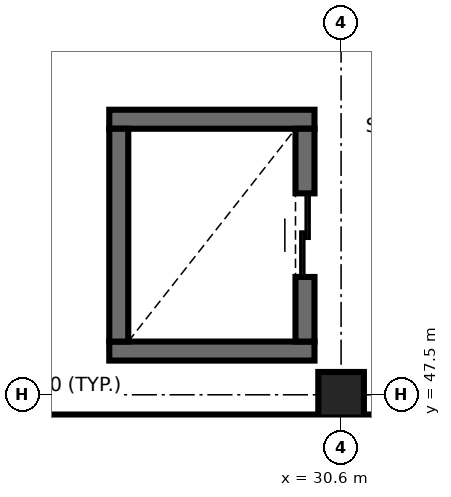
"""IFC4 building model, lengths in metres.
Left out: names, types, materials, properties, quantities, classifications, styles, units other than length and angle.
Written with IfcOpenShell. Run it as: python <this file> out.ifc"""

import sys

from ifc_helpers import new_model, si_unit, direction, frame, frame_2d, origin, origin_2d, place, context, subcontext, project, spatial, rectangle, extrude, element, fill, save


model = new_model("IFC4")
c1 = context("Model", 3, precision=1e-05, world=origin(), true_north=direction((0.0, 1.0)))
c2 = subcontext(c1, "Body", "Model", "MODEL_VIEW")
j1 = project(units=[si_unit("LENGTHUNIT", "METRE"), si_unit("PLANEANGLEUNIT", "RADIAN")], contexts=[c1])
p1 = place(None, origin())
s1 = spatial("IfcSite", under=j1, at=p1, CompositionType="ELEMENT")
p2 = place(p1, origin())
s2 = spatial("IfcBuilding", under=s1, at=p2, CompositionType="ELEMENT")
p3 = place(p2, frame((0.0, 0.0, 18.3)))
s3 = spatial("IfcBuildingStorey", under=s2, at=p3, CompositionType="ELEMENT", Elevation=18.3)
p4 = place(p3, frame((30.6, 47.5, 0.0), z_axis=(0.0, 0.0, 1.0), x_axis=(1.0, 0.0, 0.0)))
e1 = element("IfcColumn", 1, at=p4, inside=s3, PredefinedType="COLUMN", context=c2, shape_type="SweptSolid", body=[
    extrude(rectangle(XDim=0.6, YDim=0.6, at=origin_2d()), origin(), (0.0, 0.0, 1.0), 4.5),
])
for number, where, z_axis, x_axis in (
    (2, (27.55, 48.075, 0.0), (0.0, 0.0, 1.0), (1.0, 0.0, 0.0)),
    (3, (30.25, 51.125, 0.0), (0.0, 0.0, 1.0), (-1.0, 0.0, 0.0)),
):
    element("IfcWall", number, at=place(p3, frame(where, z_axis=z_axis, x_axis=x_axis)), inside=s3, PredefinedType="SHEAR", context=c2, shape_type="SweptSolid", body=[
        extrude(rectangle(XDim=2.7, YDim=0.25, at=frame_2d((1.35, 0.0))), origin(), (0.0, 0.0, 1.0), 4.5),
    ])
p5 = place(p3, frame((27.675, 51.0, 0.0), z_axis=(0.0, 0.0, 1.0), x_axis=(0.0, -1.0, 0.0)))
e4 = element("IfcWall", 4, at=p5, inside=s3, PredefinedType="SHEAR", context=c2, shape_type="SweptSolid", body=[
    extrude(rectangle(XDim=2.8, YDim=0.25, at=frame_2d((1.4, 0.0))), origin(), (0.0, 0.0, 1.0), 4.5),
])
p6 = place(p3, frame((30.125, 48.2, 0.0), z_axis=(0.0, 0.0, 1.0), x_axis=(0.0, 1.0, 0.0)))
e5 = element("IfcWall", 5, at=p6, inside=s3, PredefinedType="SHEAR", context=c2, shape_type="SweptSolid", body=[
    extrude(rectangle(XDim=2.8, YDim=0.25, at=frame_2d((1.4, 0.0))), origin(), (0.0, 0.0, 1.0), 4.5),
])
p7 = place(p6, frame((0.85, 0.0, 0.0)))
e6 = element("IfcOpeningElement", 6, at=p7, cuts=e5, PredefinedType="OPENING", context=c2, shape_type="SweptSolid", body=[
    extrude(rectangle(XDim=1.1, YDim=2.15, at=frame_2d((0.55, 1.075))), frame((0.0, 0.135, 0.0), z_axis=(0.0, -1.0, 0.0), x_axis=(1.0, 0.0, 0.0)), (0.0, 0.0, 1.0), 0.27),
])
p8 = place(p3, frame((5.922, 47.07, 0.0), z_axis=(0.0, 0.0, 1.0), x_axis=(1.0, 0.0, 0.0)))
e7 = element("IfcWall", 7, at=p8, inside=s3, PredefinedType="SOLIDWALL", context=c2, shape_type="SweptSolid", body=[
    extrude(rectangle(XDim=41.478, YDim=0.34, at=frame_2d((20.739, 0.0))), origin(), (0.0, 0.0, 1.0), 4.28),
])
p9 = place(p8, frame((3.318, 0.0, 0.9)))
e8 = element("IfcOpeningElement", 8, at=p9, cuts=e7, PredefinedType="OPENING", context=c2, shape_type="SweptSolid", body=[
    extrude(rectangle(XDim=2.7, YDim=2.1, at=frame_2d((1.35, 1.05))), frame((0.0, 0.18, 0.0), z_axis=(0.0, -1.0, 0.0), x_axis=(1.0, 0.0, 0.0)), (0.0, 0.0, 1.0), 0.36),
])
p10 = place(p8, frame((25.908, 0.0, 0.9)))
e9 = element("IfcOpeningElement", 9, at=p10, cuts=e7, PredefinedType="OPENING", context=c2, shape_type="SweptSolid", body=[
    extrude(rectangle(XDim=1.2, YDim=1.5, at=frame_2d((0.6, 0.75))), frame((0.0, 0.18, 0.0), z_axis=(0.0, -1.0, 0.0), x_axis=(1.0, 0.0, 0.0)), (0.0, 0.0, 1.0), 0.36),
])
p11 = place(p8, frame((29.408, 0.0, 0.9)))
e10 = element("IfcOpeningElement", 10, at=p11, cuts=e7, PredefinedType="OPENING", context=c2, shape_type="SweptSolid", body=[
    extrude(rectangle(XDim=1.8, YDim=1.5, at=frame_2d((0.9, 0.75))), frame((0.0, 0.18, 0.0), z_axis=(0.0, -1.0, 0.0), x_axis=(1.0, 0.0, 0.0)), (0.0, 0.0, 1.0), 0.36),
])
p12 = place(p8, frame((36.078, 0.0, 0.9)))
e11 = element("IfcOpeningElement", 11, at=p12, cuts=e7, PredefinedType="OPENING", context=c2, shape_type="SweptSolid", body=[
    extrude(rectangle(XDim=1.2, YDim=2.4, at=frame_2d((0.6, 1.2))), frame((0.0, 0.18, 0.0), z_axis=(0.0, -1.0, 0.0), x_axis=(1.0, 0.0, 0.0)), (0.0, 0.0, 1.0), 0.36),
])
p13 = place(p7, origin())
e12 = element("IfcDoor", 12, at=p13, inside=s3, OperationType="DOUBLE_DOOR_SLIDING", PredefinedType="DOOR", context=c2, shape_type="SweptSolid", body=[
    extrude(rectangle(XDim=1.1, YDim=2.15, at=frame_2d((0.55, 1.075))), frame((0.0, 0.025, 0.0), z_axis=(0.0, -1.0, 0.0), x_axis=(1.0, 0.0, 0.0)), (0.0, 0.0, 1.0), 0.05),
])
fill(e6, e12)
save(model, sys.argv[1])
